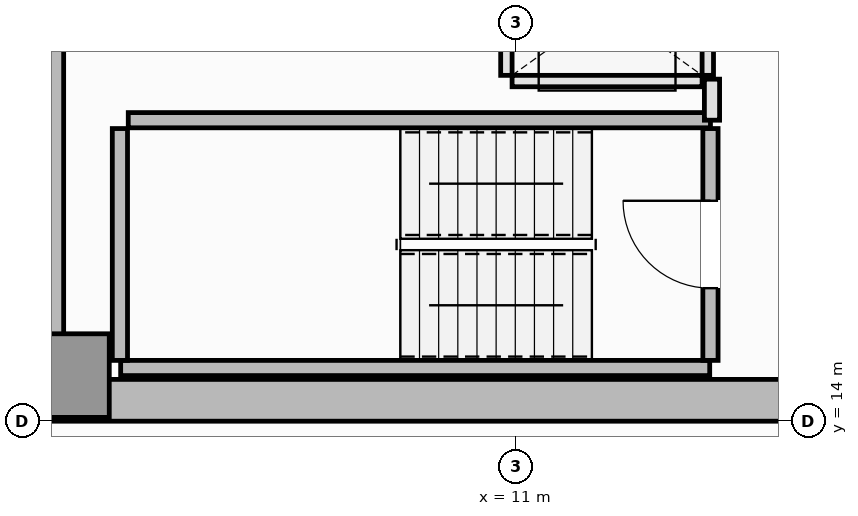
"""IFC4 building model, lengths in metres.
Left out: names, types, materials, properties, quantities, classifications, styles, units other than length and angle.
Written with IfcOpenShell. Run it as: python <this file> out.ifc"""

import sys

from ifc_helpers import new_model, si_unit, direction, frame, frame_2d, origin, origin_2d, place, context, subcontext, project, spatial, rectangle, extrude, element, fill, save


model = new_model("IFC4")
c1 = context("Model", 3, precision=1e-05, world=origin(), true_north=direction((0.0, 1.0)))
c2 = subcontext(c1, "Body", "Model", "MODEL_VIEW")
j1 = project(units=[si_unit("LENGTHUNIT", "METRE"), si_unit("PLANEANGLEUNIT", "RADIAN")], contexts=[c1])
p1 = place(None, origin())
s1 = spatial("IfcSite", under=j1, at=p1, CompositionType="ELEMENT")
p2 = place(p1, origin())
s2 = spatial("IfcBuilding", under=s1, at=p2, CompositionType="ELEMENT")
p3 = place(p2, frame((0.0, 0.0, 234.2)))
s3 = spatial("IfcBuildingStorey", under=s2, at=p3, CompositionType="ELEMENT", Elevation=234.2)
p4 = place(p3, frame((4.5, 14.275, 0.0), z_axis=(0.0, 0.0, 1.0), x_axis=(1.0, 0.0, 0.0)))
e1 = element("IfcWall", 1, at=p4, inside=s3, PredefinedType="SHEAR", context=c2, shape_type="SweptSolid", body=[
    extrude(rectangle(XDim=13.5, YDim=0.55, at=frame_2d((6.75, 0.0))), origin(), (0.0, 0.0, 1.0), 3.55),
])
p5 = place(p3, frame((4.775, 14.55, 0.0), z_axis=(0.0, 0.0, 1.0), x_axis=(0.0, 1.0, 0.0)))
e2 = element("IfcWall", 2, at=p5, inside=s3, PredefinedType="SHEAR", context=c2, shape_type="SweptSolid", body=[
    extrude(rectangle(XDim=21.4, YDim=0.55, at=frame_2d((10.7, 0.0))), origin(), (0.0, 0.0, 1.0), 3.55),
])
p6 = place(p3, frame((5.1, 14.6, 0.0), z_axis=(0.0, 0.0, 1.0), x_axis=(1.0, 0.0, 0.0)))
e3 = element("IfcColumn", 3, at=p6, inside=s3, PredefinedType="PILASTER", context=c2, shape_type="SweptSolid", body=[
    extrude(rectangle(XDim=1.1, YDim=1.1, at=origin_2d()), origin(), (0.0, 0.0, 1.0), 3.55),
])
p7 = place(p3, frame((5.8, 14.7, 0.0), z_axis=(0.0, 0.0, 1.0), x_axis=(1.0, 0.0, 0.0)))
e4 = element("IfcWall", 4, at=p7, inside=s3, PredefinedType="SOLIDWALL", context=c2, shape_type="SweptSolid", body=[
    extrude(rectangle(XDim=7.75, YDim=0.2, at=frame_2d((3.875, 0.0))), origin(), (0.0, 0.0, 1.0), 3.55),
])
p8 = place(p3, frame((5.79, 14.8, 0.0), z_axis=(0.0, 0.0, 1.0), x_axis=(0.0, 1.0, 0.0)))
e5 = element("IfcWall", 5, at=p8, inside=s3, PredefinedType="SOLIDWALL", context=c2, shape_type="SweptSolid", body=[
    extrude(rectangle(XDim=3.05, YDim=0.2, at=frame_2d((1.525, 0.0))), origin(), (0.0, 0.0, 1.0), 3.55),
])
p9 = place(p3, frame((5.9, 17.96, 0.0), z_axis=(0.0, 0.0, 1.0), x_axis=(1.0, 0.0, 0.0)))
e6 = element("IfcWall", 6, at=p9, inside=s3, PredefinedType="SOLIDWALL", context=c2, shape_type="SweptSolid", body=[
    extrude(rectangle(XDim=7.66, YDim=0.2, at=frame_2d((3.83, 0.0))), origin(), (0.0, 0.0, 1.0), 3.55),
])
p10 = place(p3, frame((13.56, 14.8, 0.0), z_axis=(0.0, 0.0, 1.0), x_axis=(0.0, 1.0, 0.0)))
e7 = element("IfcWall", 7, at=p10, inside=s3, PredefinedType="SOLIDWALL", context=c2, shape_type="SweptSolid", body=[
    extrude(rectangle(XDim=3.05, YDim=0.2, at=frame_2d((1.525, 0.0))), origin(), (0.0, 0.0, 1.0), 3.55),
])
p11 = place(p10, frame((0.95, 0.0, 0.0)))
e8 = element("IfcOpeningElement", 8, at=p11, cuts=e7, PredefinedType="OPENING", context=c2, shape_type="SweptSolid", body=[
    extrude(rectangle(XDim=1.15, YDim=2.15, at=frame_2d((0.575, 1.075))), frame((0.0, 0.11, 0.0), z_axis=(0.0, -1.0, 0.0), x_axis=(1.0, 0.0, 0.0)), (0.0, 0.0, 1.0), 0.22),
])
p12 = place(p3, frame((10.95, 18.475, 0.0), z_axis=(0.0, 0.0, 1.0), x_axis=(1.0, 0.0, 0.0)))
e9 = element("IfcWall", 9, at=p12, inside=s3, PredefinedType="PARTITIONING", context=c2, shape_type="SweptSolid", body=[
    extrude(rectangle(XDim=2.5, YDim=0.15, at=frame_2d((1.25, 0.0))), origin(), (0.0, 0.0, 1.0), 3.37),
])
p13 = place(p3, frame((10.875, 18.55, 0.0), z_axis=(0.0, 0.0, 1.0), x_axis=(0.0, 1.0, 0.0)))
e10 = element("IfcWall", 10, at=p13, inside=s3, PredefinedType="PARTITIONING", context=c2, shape_type="SweptSolid", body=[
    extrude(rectangle(XDim=1.8, YDim=0.15, at=frame_2d((0.9, 0.0))), origin(), (0.0, 0.0, 1.0), 3.37),
])
p14 = place(p3, frame((13.525, 18.55, 0.0), z_axis=(0.0, 0.0, 1.0), x_axis=(0.0, 1.0, 0.0)))
e11 = element("IfcWall", 11, at=p14, inside=s3, PredefinedType="PARTITIONING", context=c2, shape_type="SweptSolid", body=[
    extrude(rectangle(XDim=1.8, YDim=0.15, at=frame_2d((0.9, 0.0))), origin(), (0.0, 0.0, 1.0), 3.37),
])
p15 = place(p14, frame((0.35, 0.0, 0.0)))
e12 = element("IfcOpeningElement", 12, at=p15, cuts=e11, PredefinedType="OPENING", context=c2, shape_type="SweptSolid", body=[
    extrude(rectangle(XDim=1.1, YDim=2.2, at=frame_2d((0.55, 1.1))), frame((0.0, 0.085, 0.0), z_axis=(0.0, -1.0, 0.0), x_axis=(1.0, 0.0, 0.0)), (0.0, 0.0, 1.0), 0.17),
])
p16 = place(p3, frame((13.58, 17.96, 0.0), z_axis=(0.0, 0.0, 1.0), x_axis=(0.0, 1.0, 0.0)))
e13 = element("IfcWall", 13, at=p16, inside=s3, PredefinedType="PARTITIONING", context=c2, shape_type="SweptSolid", body=[
    extrude(rectangle(XDim=0.54, YDim=0.2, at=frame_2d((0.27, 0.0))), origin(), (0.0, 0.0, 1.0), 3.37),
])
p17 = place(p11, origin())
e14 = element("IfcDoor", 14, at=p17, inside=s3, OperationType="SINGLE_SWING_RIGHT", PredefinedType="DOOR", context=c2, shape_type="SweptSolid", body=[
    extrude(rectangle(XDim=1.15, YDim=2.15, at=frame_2d((0.575, 1.075))), frame((0.0, 0.025, 0.0), z_axis=(0.0, -1.0, 0.0), x_axis=(1.0, 0.0, 0.0)), (0.0, 0.0, 1.0), 0.05),
])
fill(e8, e14)
save(model, sys.argv[1])
